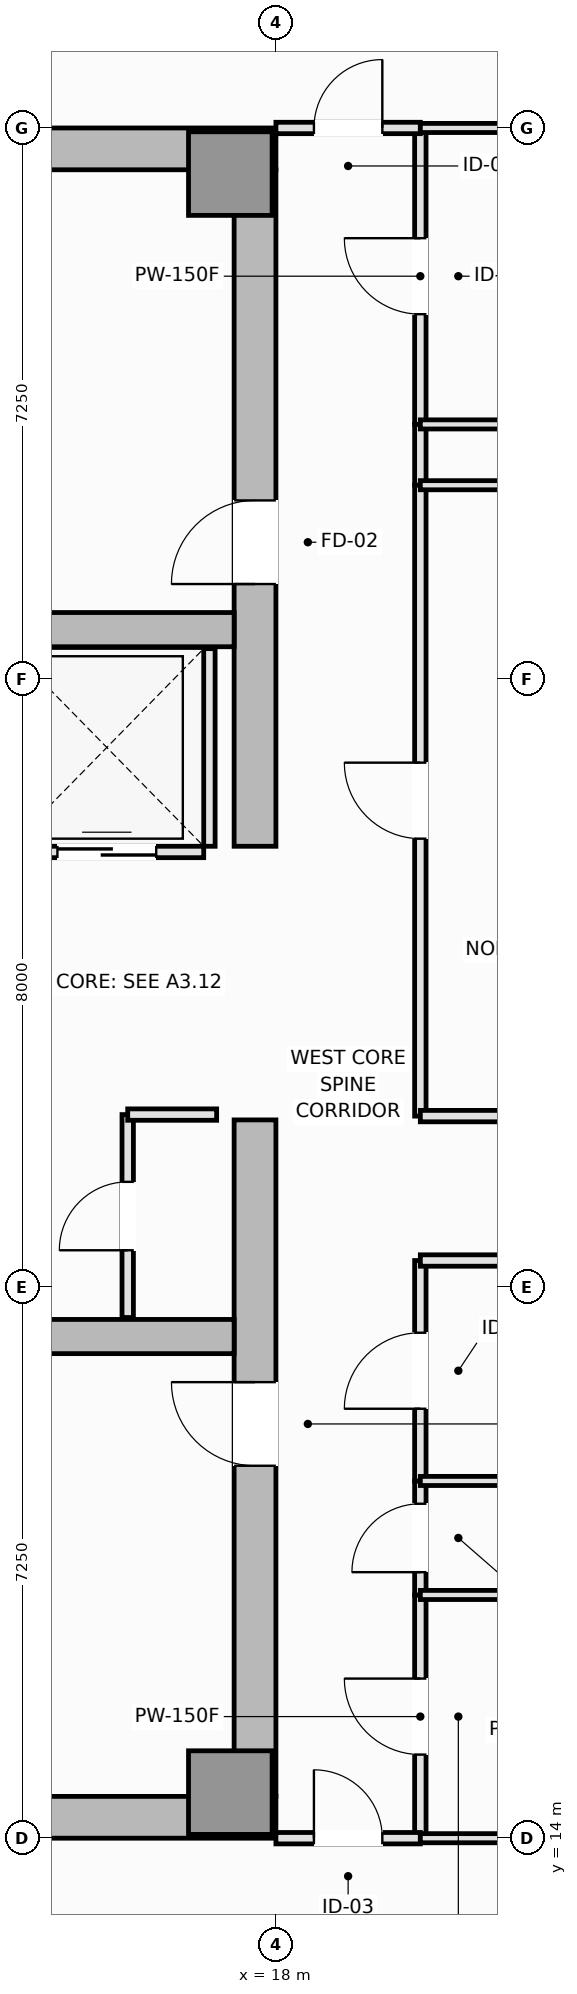
"""IFC4 building model, lengths in metres.
Left out: names, types, materials, properties, quantities, classifications, styles, units other than length and angle.
Written with IfcOpenShell. Run it as: python <this file> out.ifc"""

import sys

from ifc_helpers import new_model, si_unit, direction, frame, frame_2d, origin, origin_2d, place, context, subcontext, project, spatial, rectangle, extrude, element, fill, save


model = new_model("IFC4")
c1 = context("Model", 3, precision=1e-05, world=origin(), true_north=direction((0.0, 1.0)))
c2 = subcontext(c1, "Body", "Model", "MODEL_VIEW")
j1 = project(units=[si_unit("LENGTHUNIT", "METRE"), si_unit("PLANEANGLEUNIT", "RADIAN")], contexts=[c1])
p1 = place(None, origin())
s1 = spatial("IfcSite", under=j1, at=p1, CompositionType="ELEMENT")
p2 = place(p1, origin())
s2 = spatial("IfcBuilding", under=s1, at=p2, CompositionType="ELEMENT")
p3 = place(p2, frame((0.0, 0.0, 191.6)))
s3 = spatial("IfcBuildingStorey", under=s2, at=p3, CompositionType="ELEMENT", Elevation=191.6)
for number, where, z_axis, x_axis in (
    (1, (4.5, 14.275, 0.0), (0.0, 0.0, 1.0), (1.0, 0.0, 0.0)),
    (2, (4.5, 36.225, 0.0), (0.0, 0.0, 1.0), (1.0, 0.0, 0.0)),
):
    element("IfcWall", number, at=place(p3, frame(where, z_axis=z_axis, x_axis=x_axis)), inside=s3, PredefinedType="SHEAR", context=c2, shape_type="SweptSolid", body=[
        extrude(rectangle(XDim=13.5, YDim=0.55, at=frame_2d((6.75, 0.0))), origin(), (0.0, 0.0, 1.0), 3.55),
    ])
p4 = place(p3, frame((17.725, 14.55, 0.0), z_axis=(0.0, 0.0, 1.0), x_axis=(0.0, 1.0, 0.0)))
e3 = element("IfcWall", 3, at=p4, inside=s3, PredefinedType="SHEAR", context=c2, shape_type="SweptSolid", body=[
    extrude(rectangle(XDim=8.9, YDim=0.55, at=frame_2d((4.45, 0.0))), origin(), (0.0, 0.0, 1.0), 3.55),
])
p5 = place(p4, frame((4.35, 0.0, 0.0)))
e4 = element("IfcOpeningElement", 4, at=p5, cuts=e3, PredefinedType="OPENING", context=c2, shape_type="SweptSolid", body=[
    extrude(rectangle(XDim=1.1, YDim=2.15, at=frame_2d((0.55, 1.075))), frame((0.0, 0.285, 0.0), z_axis=(0.0, -1.0, 0.0), x_axis=(1.0, 0.0, 0.0)), (0.0, 0.0, 1.0), 0.57),
])
p6 = place(p3, frame((17.725, 27.05, 0.0), z_axis=(0.0, 0.0, 1.0), x_axis=(0.0, 1.0, 0.0)))
e5 = element("IfcWall", 5, at=p6, inside=s3, PredefinedType="SHEAR", context=c2, shape_type="SweptSolid", body=[
    extrude(rectangle(XDim=8.9, YDim=0.55, at=frame_2d((4.45, 0.0))), origin(), (0.0, 0.0, 1.0), 3.55),
])
p7 = place(p6, frame((3.45, 0.0, 0.0)))
e6 = element("IfcOpeningElement", 6, at=p7, cuts=e5, PredefinedType="OPENING", context=c2, shape_type="SweptSolid", body=[
    extrude(rectangle(XDim=1.1, YDim=2.15, at=frame_2d((0.55, 1.075))), frame((0.0, 0.285, 0.0), z_axis=(0.0, -1.0, 0.0), x_axis=(1.0, 0.0, 0.0)), (0.0, 0.0, 1.0), 0.57),
])
for number, where, z_axis, x_axis in (
    (7, (5.05, 20.6, 0.0), (0.0, 0.0, 1.0), (1.0, 0.0, 0.0)),
    (8, (5.05, 29.9, 0.0), (0.0, 0.0, 1.0), (1.0, 0.0, 0.0)),
):
    element("IfcWall", number, at=place(p3, frame(where, z_axis=z_axis, x_axis=x_axis)), inside=s3, PredefinedType="SHEAR", context=c2, shape_type="SweptSolid", body=[
        extrude(rectangle(XDim=12.4, YDim=0.45, at=frame_2d((6.2, 0.0))), origin(), (0.0, 0.0, 1.0), 3.55),
    ])
for number, where, z_axis, x_axis in (
    (9, (17.4, 14.6, 0.0), (0.0, 0.0, 1.0), (1.0, 0.0, 0.0)),
    (10, (17.4, 35.9, 0.0), (0.0, 0.0, 1.0), (1.0, 0.0, 0.0)),
):
    element("IfcColumn", number, at=place(p3, frame(where, z_axis=z_axis, x_axis=x_axis)), inside=s3, PredefinedType="PILASTER", context=c2, shape_type="SweptSolid", body=[
        extrude(rectangle(XDim=1.1, YDim=1.1, at=origin_2d()), origin(), (0.0, 0.0, 1.0), 3.55),
    ])
p8 = place(p3, frame((14.5, 26.975, 0.0), z_axis=(0.0, 0.0, 1.0), x_axis=(1.0, 0.0, 0.0)))
e11 = element("IfcWall", 11, at=p8, inside=s3, PredefinedType="PARTITIONING", context=c2, shape_type="SweptSolid", body=[
    extrude(rectangle(XDim=2.55, YDim=0.15, at=frame_2d((1.275, 0.0))), origin(), (0.0, 0.0, 1.0), 3.37),
])
p9 = place(p8, frame((0.625, 0.0, 0.0)))
e12 = element("IfcOpeningElement", 12, at=p9, cuts=e11, PredefinedType="OPENING", context=c2, shape_type="SweptSolid", body=[
    extrude(rectangle(XDim=1.3, YDim=2.2, at=frame_2d((0.65, 1.1))), frame((0.0, 0.085, 0.0), z_axis=(0.0, -1.0, 0.0), x_axis=(1.0, 0.0, 0.0)), (0.0, 0.0, 1.0), 0.17),
])
p10 = place(p3, frame((17.125, 27.05, 0.0), z_axis=(0.0, 0.0, 1.0), x_axis=(0.0, 1.0, 0.0)))
e13 = element("IfcWall", 13, at=p10, inside=s3, PredefinedType="PARTITIONING", context=c2, shape_type="SweptSolid", body=[
    extrude(rectangle(XDim=2.6, YDim=0.15, at=frame_2d((1.3, 0.0))), origin(), (0.0, 0.0, 1.0), 3.37),
])
p11 = place(p3, frame((16.05, 20.85, 0.0), z_axis=(0.0, 0.0, 1.0), x_axis=(0.0, 1.0, 0.0)))
e14 = element("IfcWall", 14, at=p11, inside=s3, PredefinedType="PARTITIONING", context=c2, shape_type="SweptSolid", body=[
    extrude(rectangle(XDim=2.67, YDim=0.15, at=frame_2d((1.335, 0.0))), origin(), (0.0, 0.0, 1.0), 3.37),
])
p12 = place(p11, frame((0.885, 0.0, 0.0)))
e15 = element("IfcOpeningElement", 15, at=p12, cuts=e14, PredefinedType="OPENING", context=c2, shape_type="SweptSolid", body=[
    extrude(rectangle(XDim=0.9, YDim=2.1, at=frame_2d((0.45, 1.05))), frame((0.0, 0.085, 0.0), z_axis=(0.0, -1.0, 0.0), x_axis=(1.0, 0.0, 0.0)), (0.0, 0.0, 1.0), 0.17),
])
p13 = place(p3, frame((16.05, 23.52, 0.0), z_axis=(0.0, 0.0, 1.0), x_axis=(1.0, 0.0, 0.0)))
e16 = element("IfcWall", 16, at=p13, inside=s3, PredefinedType="PARTITIONING", context=c2, shape_type="SweptSolid", body=[
    extrude(rectangle(XDim=1.17, YDim=0.15, at=frame_2d((0.585, 0.0))), origin(), (0.0, 0.0, 1.0), 3.37),
])
p14 = place(p3, frame((19.9, 14.0, 0.0), z_axis=(0.0, 0.0, 1.0), x_axis=(0.0, 1.0, 0.0)))
e17 = element("IfcWall", 17, at=p14, inside=s3, PredefinedType="PARTITIONING", context=c2, shape_type="SweptSolid", body=[
    extrude(rectangle(XDim=3.2, YDim=0.15, at=frame_2d((1.6, 0.0))), origin(), (0.0, 0.0, 1.0), 3.37),
])
p15 = place(p14, frame((1.1, 0.0, 0.0)))
e18 = element("IfcOpeningElement", 18, at=p15, cuts=e17, PredefinedType="OPENING", context=c2, shape_type="SweptSolid", body=[
    extrude(rectangle(XDim=1.0, YDim=2.15, at=frame_2d((0.5, 1.075))), frame((0.0, 0.085, 0.0), z_axis=(0.0, -1.0, 0.0), x_axis=(1.0, 0.0, 0.0)), (0.0, 0.0, 1.0), 0.17),
])
p16 = place(p3, frame((19.9, 17.2, 0.0), z_axis=(0.0, 0.0, 1.0), x_axis=(0.0, 1.0, 0.0)))
e19 = element("IfcWall", 19, at=p16, inside=s3, PredefinedType="PARTITIONING", context=c2, shape_type="SweptSolid", body=[
    extrude(rectangle(XDim=1.5, YDim=0.15, at=frame_2d((0.75, 0.0))), origin(), (0.0, 0.0, 1.0), 3.37),
])
p17 = place(p16, frame((0.3, 0.0, 0.0)))
e20 = element("IfcOpeningElement", 20, at=p17, cuts=e19, PredefinedType="OPENING", context=c2, shape_type="SweptSolid", body=[
    extrude(rectangle(XDim=0.9, YDim=2.1, at=frame_2d((0.45, 1.05))), frame((0.0, 0.085, 0.0), z_axis=(0.0, -1.0, 0.0), x_axis=(1.0, 0.0, 0.0)), (0.0, 0.0, 1.0), 0.17),
])
p18 = place(p3, frame((19.9, 32.6, 0.0), z_axis=(0.0, 0.0, 1.0), x_axis=(0.0, 1.0, 0.0)))
e21 = element("IfcWall", 21, at=p18, inside=s3, PredefinedType="PARTITIONING", context=c2, shape_type="SweptSolid", body=[
    extrude(rectangle(XDim=3.9, YDim=0.15, at=frame_2d((1.95, 0.0))), origin(), (0.0, 0.0, 1.0), 3.37),
])
p19 = place(p18, frame((1.45, 0.0, 0.0)))
e22 = element("IfcOpeningElement", 22, at=p19, cuts=e21, PredefinedType="OPENING", context=c2, shape_type="SweptSolid", body=[
    extrude(rectangle(XDim=1.0, YDim=2.15, at=frame_2d((0.5, 1.075))), frame((0.0, 0.085, 0.0), z_axis=(0.0, -1.0, 0.0), x_axis=(1.0, 0.0, 0.0)), (0.0, 0.0, 1.0), 0.17),
])
p20 = place(p3, frame((19.9, 31.8, 0.0), z_axis=(0.0, 0.0, 1.0), x_axis=(0.0, 1.0, 0.0)))
e23 = element("IfcWall", 23, at=p20, inside=s3, PredefinedType="PARTITIONING", context=c2, shape_type="SweptSolid", body=[
    extrude(rectangle(XDim=0.8, YDim=0.15, at=frame_2d((0.4, 0.0))), origin(), (0.0, 0.0, 1.0), 3.37),
])
p21 = place(p3, frame((19.9, 18.7, 0.0), z_axis=(0.0, 0.0, 1.0), x_axis=(0.0, 1.0, 0.0)))
e24 = element("IfcWall", 24, at=p21, inside=s3, PredefinedType="PARTITIONING", context=c2, shape_type="SweptSolid", body=[
    extrude(rectangle(XDim=2.9, YDim=0.15, at=frame_2d((1.45, 0.0))), origin(), (0.0, 0.0, 1.0), 3.37),
])
p22 = place(p21, frame((0.95, 0.0, 0.0)))
e25 = element("IfcOpeningElement", 25, at=p22, cuts=e24, PredefinedType="OPENING", context=c2, shape_type="SweptSolid", body=[
    extrude(rectangle(XDim=1.0, YDim=2.15, at=frame_2d((0.5, 1.075))), frame((0.0, 0.085, 0.0), z_axis=(0.0, -1.0, 0.0), x_axis=(1.0, 0.0, 0.0)), (0.0, 0.0, 1.0), 0.17),
])
p23 = place(p3, frame((19.9, 23.5, 0.0), z_axis=(0.0, 0.0, 1.0), x_axis=(0.0, 1.0, 0.0)))
e26 = element("IfcWall", 26, at=p23, inside=s3, PredefinedType="PARTITIONING", context=c2, shape_type="SweptSolid", body=[
    extrude(rectangle(XDim=8.3, YDim=0.15, at=frame_2d((4.15, 0.0))), origin(), (0.0, 0.0, 1.0), 3.37),
])
p24 = place(p23, frame((3.65, 0.0, 0.0)))
e27 = element("IfcOpeningElement", 27, at=p24, cuts=e26, PredefinedType="OPENING", context=c2, shape_type="SweptSolid", body=[
    extrude(rectangle(XDim=1.0, YDim=2.15, at=frame_2d((0.5, 1.075))), frame((0.0, 0.085, 0.0), z_axis=(0.0, -1.0, 0.0), x_axis=(1.0, 0.0, 0.0)), (0.0, 0.0, 1.0), 0.17),
])
p25 = place(p3, frame((18.0, 14.0, 0.0), z_axis=(0.0, 0.0, 1.0), x_axis=(1.0, 0.0, 0.0)))
e28 = element("IfcWall", 28, at=p25, inside=s3, PredefinedType="PARTITIONING", context=c2, shape_type="SweptSolid", body=[
    extrude(rectangle(XDim=1.9, YDim=0.15, at=frame_2d((0.95, 0.0))), origin(), (0.0, 0.0, 1.0), 3.37),
])
p26 = place(p25, frame((0.5, 0.0, 0.0)))
e29 = element("IfcOpeningElement", 29, at=p26, cuts=e28, PredefinedType="OPENING", context=c2, shape_type="SweptSolid", body=[
    extrude(rectangle(XDim=0.9, YDim=2.1, at=frame_2d((0.45, 1.05))), frame((0.0, 0.085, 0.0), z_axis=(0.0, -1.0, 0.0), x_axis=(1.0, 0.0, 0.0)), (0.0, 0.0, 1.0), 0.17),
])
p27 = place(p3, frame((18.0, 36.5, 0.0), z_axis=(0.0, 0.0, 1.0), x_axis=(1.0, 0.0, 0.0)))
e30 = element("IfcWall", 30, at=p27, inside=s3, PredefinedType="PARTITIONING", context=c2, shape_type="SweptSolid", body=[
    extrude(rectangle(XDim=1.9, YDim=0.15, at=frame_2d((0.95, 0.0))), origin(), (0.0, 0.0, 1.0), 3.37),
])
p28 = place(p27, frame((0.5, 0.0, 0.0)))
e31 = element("IfcOpeningElement", 31, at=p28, cuts=e30, PredefinedType="OPENING", context=c2, shape_type="SweptSolid", body=[
    extrude(rectangle(XDim=0.9, YDim=2.1, at=frame_2d((0.45, 1.05))), frame((0.0, 0.085, 0.0), z_axis=(0.0, -1.0, 0.0), x_axis=(1.0, 0.0, 0.0)), (0.0, 0.0, 1.0), 0.17),
])
p29 = place(p3, frame((19.9, 21.6, 0.0), z_axis=(0.0, 0.0, 1.0), x_axis=(1.0, 0.0, 0.0)))
e32 = element("IfcWall", 32, at=p29, inside=s3, PredefinedType="PARTITIONING", context=c2, shape_type="SweptSolid", body=[
    extrude(rectangle(XDim=4.39, YDim=0.15, at=frame_2d((2.195, 0.0))), origin(), (0.0, 0.0, 1.0), 3.37),
])
p30 = place(p3, frame((19.9, 23.5, 0.0), z_axis=(0.0, 0.0, 1.0), x_axis=(1.0, 0.0, 0.0)))
e33 = element("IfcWall", 33, at=p30, inside=s3, PredefinedType="PARTITIONING", context=c2, shape_type="SweptSolid", body=[
    extrude(rectangle(XDim=3.16, YDim=0.15, at=frame_2d((1.58, 0.0))), origin(), (0.0, 0.0, 1.0), 3.37),
])
for number, where, z_axis, x_axis in (
    (34, (19.9, 17.2, 0.0), (0.0, 0.0, 1.0), (1.0, 0.0, 0.0)),
    (35, (19.9, 14.0, 0.0), (0.0, 0.0, 1.0), (1.0, 0.0, 0.0)),
    (36, (19.9, 18.7, 0.0), (0.0, 0.0, 1.0), (1.0, 0.0, 0.0)),
):
    element("IfcWall", number, at=place(p3, frame(where, z_axis=z_axis, x_axis=x_axis)), inside=s3, PredefinedType="PARTITIONING", context=c2, shape_type="SweptSolid", body=[
        extrude(rectangle(XDim=4.2, YDim=0.12, at=frame_2d((2.1, 0.0))), origin(), (0.0, 0.0, 1.0), 3.37),
    ])
p31 = place(p3, frame((19.9, 32.6, 0.0), z_axis=(0.0, 0.0, 1.0), x_axis=(1.0, 0.0, 0.0)))
e37 = element("IfcWall", 37, at=p31, inside=s3, PredefinedType="PARTITIONING", context=c2, shape_type="SweptSolid", body=[
    extrude(rectangle(XDim=4.2, YDim=0.12, at=frame_2d((2.1, 0.0))), origin(), (0.0, 0.0, 1.0), 3.37),
])
p32 = place(p31, frame((1.6, 0.0, 0.0)))
e38 = element("IfcOpeningElement", 38, at=p32, cuts=e37, PredefinedType="OPENING", context=c2, shape_type="SweptSolid", body=[
    extrude(rectangle(XDim=1.0, YDim=2.15, at=frame_2d((0.5, 1.075))), frame((0.0, 0.07, 0.0), z_axis=(0.0, -1.0, 0.0), x_axis=(1.0, 0.0, 0.0)), (0.0, 0.0, 1.0), 0.14),
])
p33 = place(p3, frame((19.9, 36.5, 0.0), z_axis=(0.0, 0.0, 1.0), x_axis=(1.0, 0.0, 0.0)))
e39 = element("IfcWall", 39, at=p33, inside=s3, PredefinedType="PARTITIONING", context=c2, shape_type="SweptSolid", body=[
    extrude(rectangle(XDim=4.2, YDim=0.12, at=frame_2d((2.1, 0.0))), origin(), (0.0, 0.0, 1.0), 3.37),
])
p34 = place(p3, frame((19.9, 31.8, 0.0), z_axis=(0.0, 0.0, 1.0), x_axis=(1.0, 0.0, 0.0)))
e40 = element("IfcWall", 40, at=p34, inside=s3, PredefinedType="PARTITIONING", context=c2, shape_type="SweptSolid", body=[
    extrude(rectangle(XDim=3.16, YDim=0.12, at=frame_2d((1.58, 0.0))), origin(), (0.0, 0.0, 1.0), 3.37),
])
p35 = place(p9, origin())
e41 = element("IfcDoor", 41, at=p35, inside=s3, OperationType="DOUBLE_DOOR_SLIDING", PredefinedType="DOOR", context=c2, shape_type="SweptSolid", body=[
    extrude(rectangle(XDim=1.3, YDim=2.2, at=frame_2d((0.65, 1.1))), frame((0.0, 0.025, 0.0), z_axis=(0.0, -1.0, 0.0), x_axis=(1.0, 0.0, 0.0)), (0.0, 0.0, 1.0), 0.05),
])
fill(e12, e41)
p36 = place(p5, origin())
e42 = element("IfcDoor", 42, at=p36, inside=s3, OperationType="SINGLE_SWING_RIGHT", PredefinedType="DOOR", context=c2, shape_type="SweptSolid", body=[
    extrude(rectangle(XDim=1.1, YDim=2.15, at=frame_2d((0.55, 1.075))), frame((0.0, 0.025, 0.0), z_axis=(0.0, -1.0, 0.0), x_axis=(1.0, 0.0, 0.0)), (0.0, 0.0, 1.0), 0.05),
])
fill(e4, e42)
p37 = place(p7, origin())
e43 = element("IfcDoor", 43, at=p37, inside=s3, OperationType="SINGLE_SWING_LEFT", PredefinedType="DOOR", context=c2, shape_type="SweptSolid", body=[
    extrude(rectangle(XDim=1.1, YDim=2.15, at=frame_2d((0.55, 1.075))), frame((0.0, 0.025, 0.0), z_axis=(0.0, -1.0, 0.0), x_axis=(1.0, 0.0, 0.0)), (0.0, 0.0, 1.0), 0.05),
])
fill(e6, e43)
p38 = place(p12, origin())
e44 = element("IfcDoor", 44, at=p38, inside=s3, OperationType="SINGLE_SWING_LEFT", PredefinedType="DOOR", context=c2, shape_type="SweptSolid", body=[
    extrude(rectangle(XDim=0.9, YDim=2.1, at=frame_2d((0.45, 1.05))), frame((0.0, 0.025, 0.0), z_axis=(0.0, -1.0, 0.0), x_axis=(1.0, 0.0, 0.0)), (0.0, 0.0, 1.0), 0.05),
])
fill(e15, e44)
p39 = place(p15, origin())
e45 = element("IfcDoor", 45, at=p39, inside=s3, OperationType="SINGLE_SWING_RIGHT", PredefinedType="DOOR", context=c2, shape_type="SweptSolid", body=[
    extrude(rectangle(XDim=1.0, YDim=2.15, at=frame_2d((0.5, 1.075))), frame((0.0, 0.025, 0.0), z_axis=(0.0, -1.0, 0.0), x_axis=(1.0, 0.0, 0.0)), (0.0, 0.0, 1.0), 0.05),
])
fill(e18, e45)
p40 = place(p17, origin())
e46 = element("IfcDoor", 46, at=p40, inside=s3, OperationType="SINGLE_SWING_LEFT", PredefinedType="DOOR", context=c2, shape_type="SweptSolid", body=[
    extrude(rectangle(XDim=0.9, YDim=2.1, at=frame_2d((0.45, 1.05))), frame((0.0, 0.025, 0.0), z_axis=(0.0, -1.0, 0.0), x_axis=(1.0, 0.0, 0.0)), (0.0, 0.0, 1.0), 0.05),
])
fill(e20, e46)
p41 = place(p19, origin())
e47 = element("IfcDoor", 47, at=p41, inside=s3, OperationType="SINGLE_SWING_RIGHT", PredefinedType="DOOR", context=c2, shape_type="SweptSolid", body=[
    extrude(rectangle(XDim=1.0, YDim=2.15, at=frame_2d((0.5, 1.075))), frame((0.0, 0.025, 0.0), z_axis=(0.0, -1.0, 0.0), x_axis=(1.0, 0.0, 0.0)), (0.0, 0.0, 1.0), 0.05),
])
fill(e22, e47)
p42 = place(p22, origin())
e48 = element("IfcDoor", 48, at=p42, inside=s3, OperationType="SINGLE_SWING_LEFT", PredefinedType="DOOR", context=c2, shape_type="SweptSolid", body=[
    extrude(rectangle(XDim=1.0, YDim=2.15, at=frame_2d((0.5, 1.075))), frame((0.0, 0.025, 0.0), z_axis=(0.0, -1.0, 0.0), x_axis=(1.0, 0.0, 0.0)), (0.0, 0.0, 1.0), 0.05),
])
fill(e25, e48)
p43 = place(p24, origin())
e49 = element("IfcDoor", 49, at=p43, inside=s3, OperationType="SINGLE_SWING_RIGHT", PredefinedType="DOOR", context=c2, shape_type="SweptSolid", body=[
    extrude(rectangle(XDim=1.0, YDim=2.15, at=frame_2d((0.5, 1.075))), frame((0.0, 0.025, 0.0), z_axis=(0.0, -1.0, 0.0), x_axis=(1.0, 0.0, 0.0)), (0.0, 0.0, 1.0), 0.05),
])
fill(e27, e49)
p44 = place(p26, origin())
e50 = element("IfcDoor", 50, at=p44, inside=s3, OperationType="SINGLE_SWING_LEFT", PredefinedType="DOOR", context=c2, shape_type="SweptSolid", body=[
    extrude(rectangle(XDim=0.9, YDim=2.1, at=frame_2d((0.45, 1.05))), frame((0.0, 0.025, 0.0), z_axis=(0.0, -1.0, 0.0), x_axis=(1.0, 0.0, 0.0)), (0.0, 0.0, 1.0), 0.05),
])
fill(e29, e50)
p45 = place(p28, origin())
e51 = element("IfcDoor", 51, at=p45, inside=s3, OperationType="SINGLE_SWING_RIGHT", PredefinedType="DOOR", context=c2, shape_type="SweptSolid", body=[
    extrude(rectangle(XDim=0.9, YDim=2.1, at=frame_2d((0.45, 1.05))), frame((0.0, 0.025, 0.0), z_axis=(0.0, -1.0, 0.0), x_axis=(1.0, 0.0, 0.0)), (0.0, 0.0, 1.0), 0.05),
])
fill(e31, e51)
save(model, sys.argv[1])
